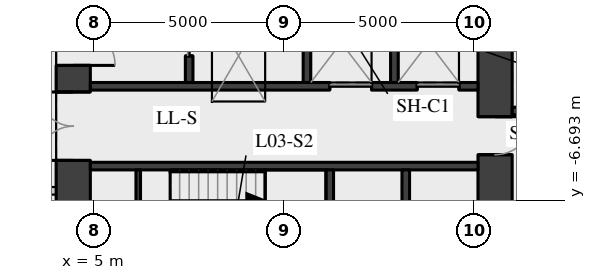
"""IFC4 building model, lengths in metres.
Left out: names, types, materials, properties, quantities, classifications, styles, units other than length and angle.
Written with IfcOpenShell. Run it as: python <this file> out.ifc"""

import sys

from ifc_helpers import new_model, si_unit, direction, frame, frame_2d, origin, place, context, subcontext, project, spatial, rectangle, extrude, element, fill, save


model = new_model("IFC4")
c1 = context("Model", 3, precision=1e-05, world=origin(), true_north=direction((0.0, 1.0)))
c2 = subcontext(c1, "Body", "Model", "MODEL_VIEW")
j1 = project(units=[si_unit("LENGTHUNIT", "METRE"), si_unit("PLANEANGLEUNIT", "RADIAN")], contexts=[c1])
p1 = place(None, origin())
s1 = spatial("IfcSite", under=j1, at=p1, CompositionType="ELEMENT")
p2 = place(p1, origin())
s2 = spatial("IfcBuilding", under=s1, at=p2, CompositionType="ELEMENT")
p3 = place(p2, frame((0.0, 0.0, 17.5)))
s3 = spatial("IfcBuildingStorey", under=s2, at=p3, CompositionType="ELEMENT", Elevation=17.5)
p4 = place(p3, frame((4.45, -11.1, 0.0), z_axis=(0.0, 0.0, 1.0), x_axis=(0.0, 1.0, 0.0)))
e1 = element("IfcWall", 1, at=p4, inside=s3, PredefinedType="SHEAR", context=c2, shape_type="SweptSolid", body=[
    extrude(rectangle(XDim=22.2, YDim=0.9, at=frame_2d((11.1, 0.0))), origin(), (0.0, 0.0, 1.0), 3.92),
])
p5 = place(p4, frame((2.35, 0.0, 0.0)))
e2 = element("IfcOpeningElement", 2, at=p5, cuts=e1, PredefinedType="OPENING", context=c2, shape_type="SweptSolid", body=[
    extrude(rectangle(XDim=1.5, YDim=2.1, at=frame_2d((0.75, 1.05))), frame((0.0, 0.46, 0.0), z_axis=(0.0, -1.0, 0.0), x_axis=(1.0, 0.0, 0.0)), (0.0, 0.0, 1.0), 0.92),
])
p6 = place(p4, frame((5.45, 0.0, 0.0)))
e3 = element("IfcOpeningElement", 3, at=p6, cuts=e1, PredefinedType="OPENING", context=c2, shape_type="SweptSolid", body=[
    extrude(rectangle(XDim=1.8, YDim=2.1, at=frame_2d((0.9, 1.05))), frame((0.0, 0.46, 0.0), z_axis=(0.0, -1.0, 0.0), x_axis=(1.0, 0.0, 0.0)), (0.0, 0.0, 1.0), 0.92),
])
p7 = place(p4, frame((7.95, 0.0, 0.0)))
e4 = element("IfcOpeningElement", 4, at=p7, cuts=e1, PredefinedType="OPENING", context=c2, shape_type="SweptSolid", body=[
    extrude(rectangle(XDim=1.1, YDim=2.1, at=frame_2d((0.55, 1.05))), frame((0.0, 0.46, 0.0), z_axis=(0.0, -1.0, 0.0), x_axis=(1.0, 0.0, 0.0)), (0.0, 0.0, 1.0), 0.92),
])
p8 = place(p4, frame((10.6, 0.0, 0.0)))
e5 = element("IfcOpeningElement", 5, at=p8, cuts=e1, PredefinedType="OPENING", context=c2, shape_type="SweptSolid", body=[
    extrude(rectangle(XDim=1.0, YDim=2.1, at=frame_2d((0.5, 1.05))), frame((0.0, 0.46, 0.0), z_axis=(0.0, -1.0, 0.0), x_axis=(1.0, 0.0, 0.0)), (0.0, 0.0, 1.0), 0.92),
])
p9 = place(p4, frame((13.15, 0.0, 0.0)))
e6 = element("IfcOpeningElement", 6, at=p9, cuts=e1, PredefinedType="OPENING", context=c2, shape_type="SweptSolid", body=[
    extrude(rectangle(XDim=1.1, YDim=2.1, at=frame_2d((0.55, 1.05))), frame((0.0, 0.46, 0.0), z_axis=(0.0, -1.0, 0.0), x_axis=(1.0, 0.0, 0.0)), (0.0, 0.0, 1.0), 0.92),
])
p10 = place(p4, frame((14.95, 0.0, 0.0)))
e7 = element("IfcOpeningElement", 7, at=p10, cuts=e1, PredefinedType="OPENING", context=c2, shape_type="SweptSolid", body=[
    extrude(rectangle(XDim=1.8, YDim=2.1, at=frame_2d((0.9, 1.05))), frame((0.0, 0.46, 0.0), z_axis=(0.0, -1.0, 0.0), x_axis=(1.0, 0.0, 0.0)), (0.0, 0.0, 1.0), 0.92),
])
p11 = place(p4, frame((18.35, 0.0, 0.0)))
e8 = element("IfcOpeningElement", 8, at=p11, cuts=e1, PredefinedType="OPENING", context=c2, shape_type="SweptSolid", body=[
    extrude(rectangle(XDim=1.5, YDim=2.1, at=frame_2d((0.75, 1.05))), frame((0.0, 0.46, 0.0), z_axis=(0.0, -1.0, 0.0), x_axis=(1.0, 0.0, 0.0)), (0.0, 0.0, 1.0), 0.92),
])
p12 = place(p3, frame((15.55, -11.1, 0.0), z_axis=(0.0, 0.0, 1.0), x_axis=(0.0, 1.0, 0.0)))
e9 = element("IfcWall", 9, at=p12, inside=s3, PredefinedType="SHEAR", context=c2, shape_type="SweptSolid", body=[
    extrude(rectangle(XDim=22.2, YDim=0.9, at=frame_2d((11.1, 0.0))), origin(), (0.0, 0.0, 1.0), 3.92),
])
p13 = place(p12, frame((15.6, 0.0, 0.0)))
e10 = element("IfcOpeningElement", 10, at=p13, cuts=e9, PredefinedType="OPENING", context=c2, shape_type="SweptSolid", body=[
    extrude(rectangle(XDim=1.0, YDim=2.1, at=frame_2d((0.5, 1.05))), frame((0.0, 0.46, 0.0), z_axis=(0.0, -1.0, 0.0), x_axis=(1.0, 0.0, 0.0)), (0.0, 0.0, 1.0), 0.92),
])
p14 = place(p12, frame((5.6, 0.0, 0.0)))
e11 = element("IfcOpeningElement", 11, at=p14, cuts=e9, PredefinedType="OPENING", context=c2, shape_type="SweptSolid", body=[
    extrude(rectangle(XDim=1.0, YDim=2.1, at=frame_2d((0.5, 1.05))), frame((0.0, 0.46, 0.0), z_axis=(0.0, -1.0, 0.0), x_axis=(1.0, 0.0, 0.0)), (0.0, 0.0, 1.0), 0.92),
])
p15 = place(p3, frame((4.9, -3.7, 0.0), z_axis=(0.0, 0.0, 1.0), x_axis=(1.0, 0.0, 0.0)))
e12 = element("IfcWall", 12, at=p15, inside=s3, PredefinedType="SHEAR", context=c2, shape_type="SweptSolid", body=[
    extrude(rectangle(XDim=10.2, YDim=0.2, at=frame_2d((5.1, 0.0))), origin(), (0.0, 0.0, 1.0), 3.92),
])
p16 = place(p15, frame((6.3, 0.0, 0.0)))
e13 = element("IfcOpeningElement", 13, at=p16, cuts=e12, PredefinedType="OPENING", context=c2, shape_type="SweptSolid", body=[
    extrude(rectangle(XDim=1.1, YDim=2.1, at=frame_2d((0.55, 1.05))), frame((0.0, 0.11, 0.0), z_axis=(0.0, -1.0, 0.0), x_axis=(1.0, 0.0, 0.0)), (0.0, 0.0, 1.0), 0.22),
])
p17 = place(p15, frame((8.6, 0.0, 0.0)))
e14 = element("IfcOpeningElement", 14, at=p17, cuts=e12, PredefinedType="OPENING", context=c2, shape_type="SweptSolid", body=[
    extrude(rectangle(XDim=1.1, YDim=2.1, at=frame_2d((0.55, 1.05))), frame((0.0, 0.11, 0.0), z_axis=(0.0, -1.0, 0.0), x_axis=(1.0, 0.0, 0.0)), (0.0, 0.0, 1.0), 0.22),
])
p18 = place(p3, frame((4.9, -5.8, 0.0), z_axis=(0.0, 0.0, 1.0), x_axis=(1.0, 0.0, 0.0)))
e15 = element("IfcWall", 15, at=p18, inside=s3, PredefinedType="SHEAR", context=c2, shape_type="SweptSolid", body=[
    extrude(rectangle(XDim=10.2, YDim=0.2, at=frame_2d((5.1, 0.0))), origin(), (0.0, 0.0, 1.0), 3.92),
])
for number, where, z_axis, x_axis in (
    (16, (11.2, -9.1, 0.0), (0.0, 0.0, 1.0), (0.0, 1.0, 0.0)),
    (17, (13.2, -9.1, 0.0), (0.0, 0.0, 1.0), (0.0, 1.0, 0.0)),
):
    element("IfcWall", number, at=place(p3, frame(where, z_axis=z_axis, x_axis=x_axis)), inside=s3, PredefinedType="SHEAR", context=c2, shape_type="SweptSolid", body=[
        extrude(rectangle(XDim=3.2, YDim=0.2, at=frame_2d((1.6, 0.0))), origin(), (0.0, 0.0, 1.0), 3.92),
    ])
p19 = place(p3, frame((7.5, -3.6, 0.0), z_axis=(0.0, 0.0, 1.0), x_axis=(0.0, 1.0, 0.0)))
e18 = element("IfcWall", 18, at=p19, inside=s3, PredefinedType="SHEAR", context=c2, shape_type="SweptSolid", body=[
    extrude(rectangle(XDim=2.5, YDim=0.2, at=frame_2d((1.25, 0.0))), origin(), (0.0, 0.0, 1.0), 3.92),
])
p20 = place(p19, frame((0.7, 0.0, 0.0)))
e19 = element("IfcOpeningElement", 19, at=p20, cuts=e18, PredefinedType="OPENING", context=c2, shape_type="SweptSolid", body=[
    extrude(rectangle(XDim=1.1, YDim=2.1, at=frame_2d((0.55, 1.05))), frame((0.0, 0.11, 0.0), z_axis=(0.0, -1.0, 0.0), x_axis=(1.0, 0.0, 0.0)), (0.0, 0.0, 1.0), 0.22),
])
for number, where, z_axis, x_axis in (
    (20, (10.6, -3.6, 0.0), (0.0, 0.0, 1.0), (0.0, 1.0, 0.0)),
    (21, (12.9, -3.6, 0.0), (0.0, 0.0, 1.0), (0.0, 1.0, 0.0)),
):
    element("IfcWall", number, at=place(p3, frame(where, z_axis=z_axis, x_axis=x_axis)), inside=s3, PredefinedType="SHEAR", context=c2, shape_type="SweptSolid", body=[
        extrude(rectangle(XDim=2.5, YDim=0.2, at=frame_2d((1.25, 0.0))), origin(), (0.0, 0.0, 1.0), 3.92),
    ])
p21 = place(p3, frame((6.16, -9.1, 0.0), z_axis=(0.0, 0.0, 1.0), x_axis=(0.0, 1.0, 0.0)))
e22 = element("IfcWall", 22, at=p21, inside=s3, PredefinedType="SHEAR", context=c2, shape_type="SweptSolid", body=[
    extrude(rectangle(XDim=3.2, YDim=0.12, at=frame_2d((1.6, 0.0))), origin(), (0.0, 0.0, 1.0), 3.92),
])
p22 = place(p21, frame((0.85, 0.0, 0.0)))
e23 = element("IfcOpeningElement", 23, at=p22, cuts=e22, PredefinedType="OPENING", context=c2, shape_type="SweptSolid", body=[
    extrude(rectangle(XDim=1.5, YDim=2.1, at=frame_2d((0.75, 1.05))), frame((0.0, 0.07, 0.0), z_axis=(0.0, -1.0, 0.0), x_axis=(1.0, 0.0, 0.0)), (0.0, 0.0, 1.0), 0.14),
])
p23 = place(p3, frame((16.0, -4.35, 0.0), z_axis=(0.0, 0.0, 1.0), x_axis=(1.0, 0.0, 0.0)))
e24 = element("IfcWall", 24, at=p23, inside=s3, PredefinedType="SHEAR", context=c2, shape_type="SweptSolid", body=[
    extrude(rectangle(XDim=2.3, YDim=0.2, at=frame_2d((1.15, 0.0))), origin(), (0.0, 0.0, 1.0), 3.92),
])
p24 = place(p3, frame((-14.6, -6.45, 0.0), z_axis=(0.0, 0.0, 1.0), x_axis=(1.0, 0.0, 0.0)))
e25 = element("IfcWall", 25, at=p24, inside=s3, PredefinedType="PARTITIONING", context=c2, shape_type="SweptSolid", body=[
    extrude(rectangle(XDim=18.602, YDim=0.2, at=frame_2d((9.301, 0.0))), origin(), (0.0, 0.0, 1.0), 3.92),
])
p25 = place(p24, frame((8.101, 0.0, 0.0)))
e26 = element("IfcOpeningElement", 26, at=p25, cuts=e25, PredefinedType="OPENING", context=c2, shape_type="SweptSolid", body=[
    extrude(rectangle(XDim=2.4, YDim=2.4, at=frame_2d((1.2, 1.2))), frame((0.0, 0.11, 0.0), z_axis=(0.0, -1.0, 0.0), x_axis=(1.0, 0.0, 0.0)), (0.0, 0.0, 1.0), 0.22),
])
p26 = place(p6, origin())
e27 = element("IfcDoor", 27, at=p26, inside=s3, OperationType="DOUBLE_DOOR_SINGLE_SWING", PredefinedType="DOOR", context=c2, shape_type="SweptSolid", body=[
    extrude(rectangle(XDim=1.8, YDim=2.1, at=frame_2d((0.9, 1.05))), frame((0.0, 0.025, 0.0), z_axis=(0.0, -1.0, 0.0), x_axis=(1.0, 0.0, 0.0)), (0.0, 0.0, 1.0), 0.05),
])
fill(e3, e27)
p27 = place(p7, origin())
e28 = element("IfcDoor", 28, at=p27, inside=s3, OperationType="SINGLE_SWING_RIGHT", PredefinedType="DOOR", context=c2, shape_type="SweptSolid", body=[
    extrude(rectangle(XDim=1.1, YDim=2.1, at=frame_2d((0.55, 1.05))), frame((0.0, 0.025, 0.0), z_axis=(0.0, -1.0, 0.0), x_axis=(1.0, 0.0, 0.0)), (0.0, 0.0, 1.0), 0.05),
])
fill(e4, e28)
p28 = place(p16, origin())
e29 = element("IfcDoor", 29, at=p28, inside=s3, OperationType="DOUBLE_DOOR_SLIDING", PredefinedType="DOOR", context=c2, shape_type="SweptSolid", body=[
    extrude(rectangle(XDim=1.1, YDim=2.1, at=frame_2d((0.55, 1.05))), frame((0.0, 0.025, 0.0), z_axis=(0.0, -1.0, 0.0), x_axis=(1.0, 0.0, 0.0)), (0.0, 0.0, 1.0), 0.05),
])
fill(e13, e29)
p29 = place(p17, origin())
e30 = element("IfcDoor", 30, at=p29, inside=s3, OperationType="DOUBLE_DOOR_SLIDING", PredefinedType="DOOR", context=c2, shape_type="SweptSolid", body=[
    extrude(rectangle(XDim=1.1, YDim=2.1, at=frame_2d((0.55, 1.05))), frame((0.0, 0.025, 0.0), z_axis=(0.0, -1.0, 0.0), x_axis=(1.0, 0.0, 0.0)), (0.0, 0.0, 1.0), 0.05),
])
fill(e14, e30)
p30 = place(p20, origin())
e31 = element("IfcDoor", 31, at=p30, inside=s3, OperationType="DOUBLE_DOOR_SLIDING", PredefinedType="DOOR", context=c2, shape_type="SweptSolid", body=[
    extrude(rectangle(XDim=1.1, YDim=2.1, at=frame_2d((0.55, 1.05))), frame((0.0, 0.025, 0.0), z_axis=(0.0, -1.0, 0.0), x_axis=(1.0, 0.0, 0.0)), (0.0, 0.0, 1.0), 0.05),
])
fill(e19, e31)
p31 = place(p14, origin())
e32 = element("IfcDoor", 32, at=p31, inside=s3, OperationType="SINGLE_SWING_LEFT", PredefinedType="DOOR", context=c2, shape_type="SweptSolid", body=[
    extrude(rectangle(XDim=1.0, YDim=2.1, at=frame_2d((0.5, 1.05))), frame((0.0, 0.025, 0.0), z_axis=(0.0, -1.0, 0.0), x_axis=(1.0, 0.0, 0.0)), (0.0, 0.0, 1.0), 0.05),
])
fill(e11, e32)
save(model, sys.argv[1])
